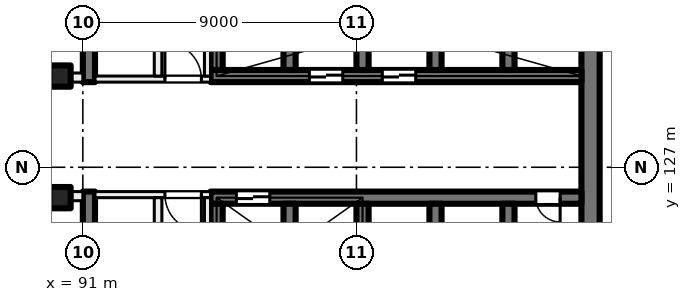
"""IFC4 building model, lengths in metres.
Left out: names, types, materials, properties, quantities, classifications, styles, units other than length and angle.
Written with IfcOpenShell. Run it as: python <this file> out.ifc"""

import sys

from ifc_helpers import new_model, si_unit, direction, frame, frame_2d, origin, origin_2d, place, context, subcontext, project, spatial, rectangle, extrude, element, fill, save


model = new_model("IFC4")
c1 = context("Model", 3, precision=1e-05, world=origin(), true_north=direction((0.0, 1.0)))
c2 = subcontext(c1, "Body", "Model", "MODEL_VIEW")
j1 = project(units=[si_unit("LENGTHUNIT", "METRE"), si_unit("PLANEANGLEUNIT", "RADIAN")], contexts=[c1])
p1 = place(None, origin())
s1 = spatial("IfcSite", under=j1, at=p1, CompositionType="ELEMENT")
p2 = place(p1, origin())
s2 = spatial("IfcBuilding", under=s1, at=p2, CompositionType="ELEMENT")
p3 = place(p2, frame((0.0, 0.0, 55.5)))
s3 = spatial("IfcBuildingStorey", under=s2, at=p3, CompositionType="ELEMENT", Elevation=55.5)
for number, where, z_axis, x_axis in (
    (1, (90.25, 130.0, 0.0), (0.0, 0.0, 1.0), (1.0, 0.0, 0.0)),
    (2, (90.25, 126.0, 0.0), (0.0, 0.0, 1.0), (1.0, 0.0, 0.0)),
):
    element("IfcColumn", number, at=place(p3, frame(where, z_axis=z_axis, x_axis=x_axis)), inside=s3, PredefinedType="COLUMN", context=c2, shape_type="SweptSolid", body=[
        extrude(rectangle(XDim=0.7, YDim=0.7, at=origin_2d()), origin(), (0.0, 0.0, 1.0), 4.0),
    ])
p4 = place(p3, frame((107.7, 135.2, 0.0), z_axis=(0.0, 0.0, 1.0), x_axis=(0.0, -1.0, 0.0)))
e3 = element("IfcWall", 3, at=p4, inside=s3, PredefinedType="SHEAR", context=c2, shape_type="SweptSolid", body=[
    extrude(rectangle(XDim=14.4, YDim=0.6, at=frame_2d((7.2, 0.0))), origin(), (0.0, 0.0, 1.0), 4.0),
])
p5 = place(p3, frame((107.4, 130.0, 0.0), z_axis=(0.0, 0.0, 1.0), x_axis=(-1.0, 0.0, 0.0)))
e4 = element("IfcWall", 4, at=p5, inside=s3, PredefinedType="SHEAR", context=c2, shape_type="SweptSolid", body=[
    extrude(rectangle(XDim=12.2, YDim=0.4, at=frame_2d((6.1, 0.0))), origin(), (0.0, 0.0, 1.0), 4.0),
])
p6 = place(p5, frame((5.45, 0.0, 0.0)))
e5 = element("IfcOpeningElement", 5, at=p6, cuts=e4, PredefinedType="OPENING", context=c2, shape_type="SweptSolid", body=[
    extrude(rectangle(XDim=1.1, YDim=2.1, at=frame_2d((0.55, 1.05))), frame((0.0, 0.21, 0.0), z_axis=(0.0, -1.0, 0.0), x_axis=(1.0, 0.0, 0.0)), (0.0, 0.0, 1.0), 0.42),
])
p7 = place(p5, frame((7.85, 0.0, 0.0)))
e6 = element("IfcOpeningElement", 6, at=p7, cuts=e4, PredefinedType="OPENING", context=c2, shape_type="SweptSolid", body=[
    extrude(rectangle(XDim=1.1, YDim=2.1, at=frame_2d((0.55, 1.05))), frame((0.0, 0.21, 0.0), z_axis=(0.0, -1.0, 0.0), x_axis=(1.0, 0.0, 0.0)), (0.0, 0.0, 1.0), 0.42),
])
for number, where, z_axis, x_axis in (
    (7, (105.0, 133.2, 0.0), (0.0, 0.0, 1.0), (0.0, -1.0, 0.0)),
    (8, (102.6, 133.2, 0.0), (0.0, 0.0, 1.0), (0.0, -1.0, 0.0)),
    (9, (100.2, 133.2, 0.0), (0.0, 0.0, 1.0), (0.0, -1.0, 0.0)),
    (10, (97.8, 133.2, 0.0), (0.0, 0.0, 1.0), (0.0, -1.0, 0.0)),
    (11, (95.4, 133.2, 0.0), (0.0, 0.0, 1.0), (0.0, -1.0, 0.0)),
):
    element("IfcWall", number, at=place(p3, frame(where, z_axis=z_axis, x_axis=x_axis)), inside=s3, PredefinedType="SHEAR", context=c2, shape_type="SweptSolid", body=[
        extrude(rectangle(XDim=3.0, YDim=0.4, at=frame_2d((1.5, 0.0))), origin(), (0.0, 0.0, 1.0), 4.0),
    ])
p8 = place(p3, frame((107.4, 126.0, 0.0), z_axis=(0.0, 0.0, 1.0), x_axis=(-1.0, 0.0, 0.0)))
e12 = element("IfcWall", 12, at=p8, inside=s3, PredefinedType="SHEAR", context=c2, shape_type="SweptSolid", body=[
    extrude(rectangle(XDim=12.2, YDim=0.4, at=frame_2d((6.1, 0.0))), origin(), (0.0, 0.0, 1.0), 4.0),
])
p9 = place(p8, frame((10.25, 0.0, 0.0)))
e13 = element("IfcOpeningElement", 13, at=p9, cuts=e12, PredefinedType="OPENING", context=c2, shape_type="SweptSolid", body=[
    extrude(rectangle(XDim=1.1, YDim=2.1, at=frame_2d((0.55, 1.05))), frame((0.0, 0.21, 0.0), z_axis=(0.0, -1.0, 0.0), x_axis=(1.0, 0.0, 0.0)), (0.0, 0.0, 1.0), 0.42),
])
p10 = place(p8, frame((0.7, 0.0, 0.0)))
e14 = element("IfcOpeningElement", 14, at=p10, cuts=e12, PredefinedType="OPENING", context=c2, shape_type="SweptSolid", body=[
    extrude(rectangle(XDim=0.8, YDim=2.1, at=frame_2d((0.4, 1.05))), frame((0.0, 0.21, 0.0), z_axis=(0.0, -1.0, 0.0), x_axis=(1.0, 0.0, 0.0)), (0.0, 0.0, 1.0), 0.42),
])
for number, where, z_axis, x_axis in (
    (15, (105.0, 125.8, 0.0), (0.0, 0.0, 1.0), (0.0, -1.0, 0.0)),
    (16, (102.6, 125.8, 0.0), (0.0, 0.0, 1.0), (0.0, -1.0, 0.0)),
    (17, (100.2, 125.8, 0.0), (0.0, 0.0, 1.0), (0.0, -1.0, 0.0)),
    (18, (97.8, 125.8, 0.0), (0.0, 0.0, 1.0), (0.0, -1.0, 0.0)),
    (19, (95.4, 125.8, 0.0), (0.0, 0.0, 1.0), (0.0, -1.0, 0.0)),
):
    element("IfcWall", number, at=place(p3, frame(where, z_axis=z_axis, x_axis=x_axis)), inside=s3, PredefinedType="SHEAR", context=c2, shape_type="SweptSolid", body=[
        extrude(rectangle(XDim=3.0, YDim=0.4, at=frame_2d((1.5, 0.0))), origin(), (0.0, 0.0, 1.0), 4.0),
    ])
for number, where, z_axis, x_axis in (
    (20, (91.2, 138.4, 0.0), (0.0, 0.0, 1.0), (0.0, -1.0, 0.0)),
    (21, (91.2, 126.2, 0.0), (0.0, 0.0, 1.0), (0.0, -1.0, 0.0)),
):
    element("IfcWall", number, at=place(p3, frame(where, z_axis=z_axis, x_axis=x_axis)), inside=s3, PredefinedType="SHEAR", context=c2, shape_type="SweptSolid", body=[
        extrude(rectangle(XDim=8.6, YDim=0.4, at=frame_2d((4.3, 0.0))), origin(), (0.0, 0.0, 1.0), 4.0),
    ])
p11 = place(p3, frame((95.2, 126.1, 0.0), z_axis=(0.0, 0.0, 1.0), x_axis=(-1.0, 0.0, 0.0)))
e22 = element("IfcWall", 22, at=p11, inside=s3, PredefinedType="PARTITIONING", context=c2, shape_type="SweptSolid", body=[
    extrude(rectangle(XDim=3.8, YDim=0.2, at=frame_2d((1.9, 0.0))), origin(), (0.0, 0.0, 1.0), 3.625),
])
p12 = place(p11, frame((0.3, 0.0, 0.0)))
e23 = element("IfcOpeningElement", 23, at=p12, cuts=e22, PredefinedType="OPENING", context=c2, shape_type="SweptSolid", body=[
    extrude(rectangle(XDim=1.2, YDim=2.1, at=frame_2d((0.6, 1.05))), frame((0.0, 0.11, 0.0), z_axis=(0.0, -1.0, 0.0), x_axis=(1.0, 0.0, 0.0)), (0.0, 0.0, 1.0), 0.22),
])
p13 = place(p3, frame((95.1, 117.6, 0.0), z_axis=(0.0, 0.0, 1.0), x_axis=(0.0, 1.0, 0.0)))
e24 = element("IfcWall", 24, at=p13, inside=s3, PredefinedType="PARTITIONING", context=c2, shape_type="SweptSolid", body=[
    extrude(rectangle(XDim=8.4, YDim=0.2, at=frame_2d((4.2, 0.0))), origin(), (0.0, 0.0, 1.0), 3.625),
])
p14 = place(p13, frame((1.65, 0.0, 0.0)))
e25 = element("IfcOpeningElement", 25, at=p14, cuts=e24, PredefinedType="OPENING", context=c2, shape_type="SweptSolid", body=[
    extrude(rectangle(XDim=1.5, YDim=2.1, at=frame_2d((0.75, 1.05))), frame((0.0, 0.11, 0.0), z_axis=(0.0, -1.0, 0.0), x_axis=(1.0, 0.0, 0.0)), (0.0, 0.0, 1.0), 0.22),
])
p15 = place(p3, frame((93.475, 117.6, 0.0), z_axis=(0.0, 0.0, 1.0), x_axis=(0.0, 1.0, 0.0)))
e26 = element("IfcWall", 26, at=p15, inside=s3, PredefinedType="PARTITIONING", context=c2, shape_type="SweptSolid", body=[
    extrude(rectangle(XDim=8.4, YDim=0.25, at=frame_2d((4.2, 0.0))), origin(), (0.0, 0.0, 1.0), 3.625),
])
p16 = place(p15, frame((5.925, 0.0, 0.0)))
e27 = element("IfcOpeningElement", 27, at=p16, cuts=e26, PredefinedType="OPENING", context=c2, shape_type="SweptSolid", body=[
    extrude(rectangle(XDim=0.8, YDim=2.1, at=frame_2d((0.4, 1.05))), frame((0.0, 0.135, 0.0), z_axis=(0.0, -1.0, 0.0), x_axis=(1.0, 0.0, 0.0)), (0.0, 0.0, 1.0), 0.27),
])
p17 = place(p15, frame((1.675, 0.0, 0.0)))
e28 = element("IfcOpeningElement", 28, at=p17, cuts=e26, PredefinedType="OPENING", context=c2, shape_type="SweptSolid", body=[
    extrude(rectangle(XDim=0.8, YDim=2.1, at=frame_2d((0.4, 1.05))), frame((0.0, 0.135, 0.0), z_axis=(0.0, -1.0, 0.0), x_axis=(1.0, 0.0, 0.0)), (0.0, 0.0, 1.0), 0.27),
])
p18 = place(p3, frame((91.4, 129.9, 0.0), z_axis=(0.0, 0.0, 1.0), x_axis=(1.0, 0.0, 0.0)))
e29 = element("IfcWall", 29, at=p18, inside=s3, PredefinedType="PARTITIONING", context=c2, shape_type="SweptSolid", body=[
    extrude(rectangle(XDim=3.8, YDim=0.2, at=frame_2d((1.9, 0.0))), origin(), (0.0, 0.0, 1.0), 3.625),
])
p19 = place(p18, frame((2.3, 0.0, 0.0)))
e30 = element("IfcOpeningElement", 30, at=p19, cuts=e29, PredefinedType="OPENING", context=c2, shape_type="SweptSolid", body=[
    extrude(rectangle(XDim=1.2, YDim=2.1, at=frame_2d((0.6, 1.05))), frame((0.0, 0.11, 0.0), z_axis=(0.0, -1.0, 0.0), x_axis=(1.0, 0.0, 0.0)), (0.0, 0.0, 1.0), 0.22),
])
p20 = place(p3, frame((95.1, 130.0, 0.0), z_axis=(0.0, 0.0, 1.0), x_axis=(0.0, 1.0, 0.0)))
e31 = element("IfcWall", 31, at=p20, inside=s3, PredefinedType="PARTITIONING", context=c2, shape_type="SweptSolid", body=[
    extrude(rectangle(XDim=8.4, YDim=0.2, at=frame_2d((4.2, 0.0))), origin(), (0.0, 0.0, 1.0), 3.625),
])
p21 = place(p20, frame((5.25, 0.0, 0.0)))
e32 = element("IfcOpeningElement", 32, at=p21, cuts=e31, PredefinedType="OPENING", context=c2, shape_type="SweptSolid", body=[
    extrude(rectangle(XDim=1.5, YDim=2.1, at=frame_2d((0.75, 1.05))), frame((0.0, 0.11, 0.0), z_axis=(0.0, -1.0, 0.0), x_axis=(1.0, 0.0, 0.0)), (0.0, 0.0, 1.0), 0.22),
])
p22 = place(p3, frame((93.475, 130.0, 0.0), z_axis=(0.0, 0.0, 1.0), x_axis=(0.0, 1.0, 0.0)))
e33 = element("IfcWall", 33, at=p22, inside=s3, PredefinedType="PARTITIONING", context=c2, shape_type="SweptSolid", body=[
    extrude(rectangle(XDim=8.4, YDim=0.25, at=frame_2d((4.2, 0.0))), origin(), (0.0, 0.0, 1.0), 3.625),
])
p23 = place(p22, frame((3.8, 0.0, 0.0)))
e34 = element("IfcOpeningElement", 34, at=p23, cuts=e33, PredefinedType="OPENING", context=c2, shape_type="SweptSolid", body=[
    extrude(rectangle(XDim=0.8, YDim=2.1, at=frame_2d((0.4, 1.05))), frame((0.0, 0.135, 0.0), z_axis=(0.0, -1.0, 0.0), x_axis=(1.0, 0.0, 0.0)), (0.0, 0.0, 1.0), 0.27),
])
p24 = place(p3, frame((72.5, 129.95, 0.0), z_axis=(0.0, 0.0, 1.0), x_axis=(1.0, 0.0, 0.0)))
e35 = element("IfcWall", 35, at=p24, inside=s3, PredefinedType="PARTITIONING", context=c2, shape_type="SweptSolid", body=[
    extrude(rectangle(XDim=18.5, YDim=0.3, at=frame_2d((9.25, 0.0))), origin(), (0.0, 0.0, 1.0), 3.625),
])
p25 = place(p24, frame((6.0, 0.0, 0.0)))
e36 = element("IfcOpeningElement", 36, at=p25, cuts=e35, PredefinedType="OPENING", context=c2, shape_type="SweptSolid", body=[
    extrude(rectangle(XDim=1.0, YDim=2.1, at=frame_2d((0.5, 1.05))), frame((0.0, 0.16, 0.0), z_axis=(0.0, -1.0, 0.0), x_axis=(1.0, 0.0, 0.0)), (0.0, 0.0, 1.0), 0.32),
])
p26 = place(p24, frame((1.225, 0.0, 0.0)))
e37 = element("IfcOpeningElement", 37, at=p26, cuts=e35, PredefinedType="OPENING", context=c2, shape_type="SweptSolid", body=[
    extrude(rectangle(XDim=1.8, YDim=2.1, at=frame_2d((0.9, 1.05))), frame((0.0, 0.16, 0.0), z_axis=(0.0, -1.0, 0.0), x_axis=(1.0, 0.0, 0.0)), (0.0, 0.0, 1.0), 0.32),
])
p27 = place(p3, frame((91.0, 126.05, 0.0), z_axis=(0.0, 0.0, 1.0), x_axis=(-1.0, 0.0, 0.0)))
e38 = element("IfcWall", 38, at=p27, inside=s3, PredefinedType="PARTITIONING", context=c2, shape_type="SweptSolid", body=[
    extrude(rectangle(XDim=43.785, YDim=0.3, at=frame_2d((21.893, 0.0))), origin(), (0.0, 0.0, 1.0), 3.625),
])
p28 = place(p27, frame((4.375, 0.0, 0.0)))
e39 = element("IfcOpeningElement", 39, at=p28, cuts=e38, PredefinedType="OPENING", context=c2, shape_type="SweptSolid", body=[
    extrude(rectangle(XDim=1.0, YDim=2.1, at=frame_2d((0.5, 1.05))), frame((0.0, 0.16, 0.0), z_axis=(0.0, -1.0, 0.0), x_axis=(1.0, 0.0, 0.0)), (0.0, 0.0, 1.0), 0.32),
])
p29 = place(p27, frame((15.0, 0.0, 0.0)))
e40 = element("IfcOpeningElement", 40, at=p29, cuts=e38, PredefinedType="OPENING", context=c2, shape_type="SweptSolid", body=[
    extrude(rectangle(XDim=1.0, YDim=2.1, at=frame_2d((0.5, 1.05))), frame((0.0, 0.16, 0.0), z_axis=(0.0, -1.0, 0.0), x_axis=(1.0, 0.0, 0.0)), (0.0, 0.0, 1.0), 0.32),
])
p30 = place(p27, frame((34.0, 0.0, 0.0)))
e41 = element("IfcOpeningElement", 41, at=p30, cuts=e38, PredefinedType="OPENING", context=c2, shape_type="SweptSolid", body=[
    extrude(rectangle(XDim=1.0, YDim=2.1, at=frame_2d((0.5, 1.05))), frame((0.0, 0.16, 0.0), z_axis=(0.0, -1.0, 0.0), x_axis=(1.0, 0.0, 0.0)), (0.0, 0.0, 1.0), 0.32),
])
p31 = place(p27, frame((39.296, 0.0, 0.0)))
e42 = element("IfcOpeningElement", 42, at=p31, cuts=e38, PredefinedType="OPENING", context=c2, shape_type="SweptSolid", body=[
    extrude(rectangle(XDim=1.8, YDim=2.1, at=frame_2d((0.9, 1.05))), frame((0.0, 0.16, 0.0), z_axis=(0.0, -1.0, 0.0), x_axis=(1.0, 0.0, 0.0)), (0.0, 0.0, 1.0), 0.32),
])
p32 = place(p9, origin())
e43 = element("IfcDoor", 43, at=p32, inside=s3, OperationType="DOUBLE_DOOR_SLIDING", PredefinedType="DOOR", context=c2, shape_type="SweptSolid", body=[
    extrude(rectangle(XDim=1.1, YDim=2.1, at=frame_2d((0.55, 1.05))), frame((0.0, 0.025, 0.0), z_axis=(0.0, -1.0, 0.0), x_axis=(1.0, 0.0, 0.0)), (0.0, 0.0, 1.0), 0.05),
])
fill(e13, e43)
p33 = place(p6, origin())
e44 = element("IfcDoor", 44, at=p33, inside=s3, OperationType="DOUBLE_DOOR_SLIDING", PredefinedType="DOOR", context=c2, shape_type="SweptSolid", body=[
    extrude(rectangle(XDim=1.1, YDim=2.1, at=frame_2d((0.55, 1.05))), frame((0.0, 0.025, 0.0), z_axis=(0.0, -1.0, 0.0), x_axis=(1.0, 0.0, 0.0)), (0.0, 0.0, 1.0), 0.05),
])
fill(e5, e44)
p34 = place(p7, origin())
e45 = element("IfcDoor", 45, at=p34, inside=s3, OperationType="DOUBLE_DOOR_SLIDING", PredefinedType="DOOR", context=c2, shape_type="SweptSolid", body=[
    extrude(rectangle(XDim=1.1, YDim=2.1, at=frame_2d((0.55, 1.05))), frame((0.0, 0.025, 0.0), z_axis=(0.0, -1.0, 0.0), x_axis=(1.0, 0.0, 0.0)), (0.0, 0.0, 1.0), 0.05),
])
fill(e6, e45)
p35 = place(p10, origin())
e46 = element("IfcDoor", 46, at=p35, inside=s3, OperationType="SINGLE_SWING_LEFT", PredefinedType="DOOR", context=c2, shape_type="SweptSolid", body=[
    extrude(rectangle(XDim=0.8, YDim=2.1, at=frame_2d((0.4, 1.05))), frame((0.0, 0.025, 0.0), z_axis=(0.0, -1.0, 0.0), x_axis=(1.0, 0.0, 0.0)), (0.0, 0.0, 1.0), 0.05),
])
fill(e14, e46)
p36 = place(p12, origin())
e47 = element("IfcDoor", 47, at=p36, inside=s3, OperationType="DOUBLE_DOOR_SINGLE_SWING", PredefinedType="DOOR", context=c2, shape_type="SweptSolid", body=[
    extrude(rectangle(XDim=1.2, YDim=2.1, at=frame_2d((0.6, 1.05))), frame((0.0, 0.025, 0.0), z_axis=(0.0, -1.0, 0.0), x_axis=(1.0, 0.0, 0.0)), (0.0, 0.0, 1.0), 0.05),
])
fill(e23, e47)
p37 = place(p19, origin())
e48 = element("IfcDoor", 48, at=p37, inside=s3, OperationType="DOUBLE_DOOR_SINGLE_SWING", PredefinedType="DOOR", context=c2, shape_type="SweptSolid", body=[
    extrude(rectangle(XDim=1.2, YDim=2.1, at=frame_2d((0.6, 1.05))), frame((0.0, 0.025, 0.0), z_axis=(0.0, -1.0, 0.0), x_axis=(1.0, 0.0, 0.0)), (0.0, 0.0, 1.0), 0.05),
])
fill(e30, e48)
save(model, sys.argv[1])
